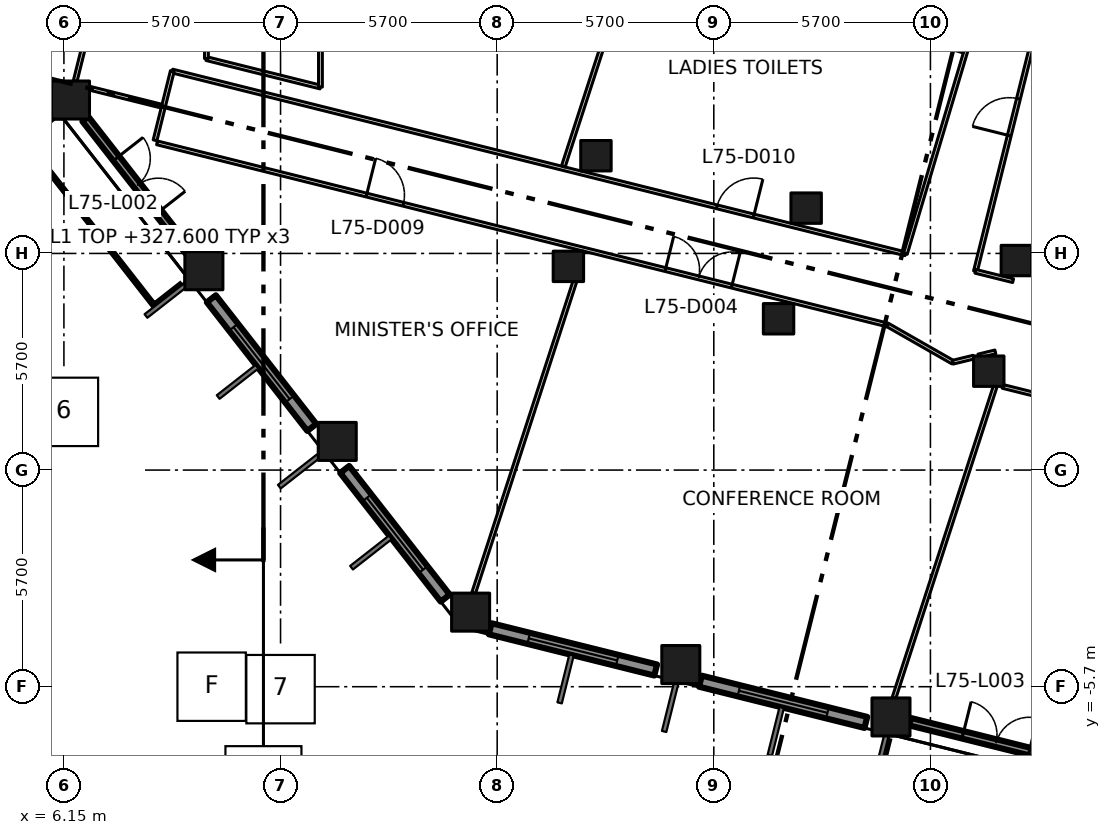
"""IFC4 building model, lengths in metres.
Left out: names, types, materials, properties, quantities, classifications, styles, units other than length and angle.
Written with IfcOpenShell. Run it as: python <this file> out.ifc"""

import sys

from ifc_helpers import new_model, si_unit, direction, frame, frame_2d, origin, origin_2d, place, context, subcontext, project, spatial, rectangle, extrude, element, fill, save


model = new_model("IFC4")
c1 = context("Model", 3, precision=1e-05, world=origin(), true_north=direction((0.0, 1.0)))
c2 = subcontext(c1, "Body", "Model", "MODEL_VIEW")
j1 = project(units=[si_unit("LENGTHUNIT", "METRE"), si_unit("PLANEANGLEUNIT", "RADIAN")], contexts=[c1])
p1 = place(None, origin())
s1 = spatial("IfcSite", under=j1, at=p1, CompositionType="ELEMENT")
p2 = place(p1, origin())
s2 = spatial("IfcBuilding", under=s1, at=p2, CompositionType="ELEMENT")
p3 = place(p2, frame((0.0, 0.0, 327.6)))
s3 = spatial("IfcBuildingStorey", under=s2, at=p3, CompositionType="ELEMENT", Elevation=327.6)
for number, where, z_axis, x_axis in (
    (1, (16.851, -3.738, 0.0), (0.0, 0.0, 1.0), (1.0, 0.0, 0.0)),
    (2, (13.342, 0.754, 0.0), (0.0, 0.0, 1.0), (1.0, 0.0, 0.0)),
    (3, (9.833, 5.245, 0.0), (0.0, 0.0, 1.0), (1.0, 0.0, 0.0)),
    (4, (6.323, 9.737, 0.0), (0.0, 0.0, 1.0), (1.0, 0.0, 0.0)),
    (5, (22.382, -5.117, 0.0), (0.0, 0.0, 1.0), (1.0, 0.0, 0.0)),
    (6, (27.912, -6.496, 0.0), (0.0, 0.0, 1.0), (1.0, 0.0, 0.0)),
):
    element("IfcColumn", number, at=place(p3, frame(where, z_axis=z_axis, x_axis=x_axis)), inside=s3, PredefinedType="COLUMN", context=c2, shape_type="SweptSolid", body=[
        extrude(rectangle(XDim=1.0, YDim=1.0, at=origin_2d()), origin(), (0.0, 0.0, 1.0), 4.2),
    ])
for number, where, z_axis, x_axis in (
    (7, (19.424, 5.36, 0.0), (0.0, 0.0, 1.0), (1.0, 0.0, 0.0)),
    (8, (24.954, 3.981, 0.0), (0.0, 0.0, 1.0), (1.0, 0.0, 0.0)),
    (9, (30.485, 2.602, 0.0), (0.0, 0.0, 1.0), (1.0, 0.0, 0.0)),
    (10, (20.149, 8.271, 0.0), (0.0, 0.0, 1.0), (1.0, 0.0, 0.0)),
    (11, (25.68, 6.892, 0.0), (0.0, 0.0, 1.0), (1.0, 0.0, 0.0)),
    (12, (31.211, 5.513, 0.0), (0.0, 0.0, 1.0), (1.0, 0.0, 0.0)),
):
    element("IfcColumn", number, at=place(p3, frame(where, z_axis=z_axis, x_axis=x_axis)), inside=s3, PredefinedType="COLUMN", context=c2, shape_type="SweptSolid", body=[
        extrude(rectangle(XDim=0.8, YDim=0.8, at=origin_2d()), origin(), (0.0, 0.0, 1.0), 4.2),
    ])
p4 = place(p3, frame((6.715, 9.237, 0.0), z_axis=(0.0, 0.0, 1.0), x_axis=(0.615465445194, -0.788163869873, 0.0)))
e13 = element("IfcWall", 13, at=p4, inside=s3, PredefinedType="SOLIDWALL", context=c2, shape_type="SweptSolid", body=[
    extrude(rectangle(XDim=4.43, YDim=0.2, at=frame_2d((2.215, 0.0))), origin(), (0.0, 0.0, 1.0), 3.2),
])
p5 = place(p4, frame((1.315, 0.0, 0.0)))
e14 = element("IfcOpeningElement", 14, at=p5, cuts=e13, PredefinedType="OPENING", context=c2, shape_type="SweptSolid", body=[
    extrude(rectangle(XDim=1.8, YDim=2.9, at=frame_2d((0.9, 1.45))), frame((0.0, 0.11, 0.0), z_axis=(0.0, -1.0, 0.0), x_axis=(1.0, 0.0, 0.0)), (0.0, 0.0, 1.0), 0.22),
])
p6 = place(p3, frame((10.029, 4.507, 0.0), z_axis=(0.0, 0.0, 1.0), x_axis=(0.615572343689, -0.788080382756, 0.0)))
e15 = element("IfcWall", 15, at=p6, inside=s3, PredefinedType="SOLIDWALL", context=c2, shape_type="SweptSolid", body=[
    extrude(rectangle(XDim=4.295, YDim=0.3, at=frame_2d((2.147, 0.0))), origin(), (0.0, 0.0, 1.0), 3.2),
])
p7 = place(p6, frame((0.948, 0.0, 0.8)))
e16 = element("IfcOpeningElement", 16, at=p7, cuts=e15, PredefinedType="OPENING", context=c2, shape_type="SweptSolid", body=[
    extrude(rectangle(XDim=2.4, YDim=2.1, at=frame_2d((1.2, 1.05))), frame((0.0, 0.16, 0.0), z_axis=(0.0, -1.0, 0.0), x_axis=(1.0, 0.0, 0.0)), (0.0, 0.0, 1.0), 0.32),
])
p8 = place(p3, frame((13.538, 0.016, 0.0), z_axis=(0.0, 0.0, 1.0), x_axis=(0.615713519567, -0.787970089421, 0.0)))
e17 = element("IfcWall", 17, at=p8, inside=s3, PredefinedType="SOLIDWALL", context=c2, shape_type="SweptSolid", body=[
    extrude(rectangle(XDim=4.296, YDim=0.3, at=frame_2d((2.148, 0.0))), origin(), (0.0, 0.0, 1.0), 3.2),
])
p9 = place(p8, frame((0.948, 0.0, 0.8)))
e18 = element("IfcOpeningElement", 18, at=p9, cuts=e17, PredefinedType="OPENING", context=c2, shape_type="SweptSolid", body=[
    extrude(rectangle(XDim=2.4, YDim=2.1, at=frame_2d((1.2, 1.05))), frame((0.0, 0.16, 0.0), z_axis=(0.0, -1.0, 0.0), x_axis=(1.0, 0.0, 0.0)), (0.0, 0.0, 1.0), 0.32),
])
p10 = place(p3, frame((17.367, -4.176, 0.0), z_axis=(0.0, 0.0, 1.0), x_axis=(0.970327846266, -0.241793032904, 0.0)))
e19 = element("IfcWall", 19, at=p10, inside=s3, PredefinedType="SOLIDWALL", context=c2, shape_type="SweptSolid", body=[
    extrude(rectangle(XDim=4.487, YDim=0.3, at=frame_2d((2.244, 0.0))), origin(), (0.0, 0.0, 1.0), 3.2),
])
p11 = place(p10, frame((1.044, 0.0, 0.8)))
e20 = element("IfcOpeningElement", 20, at=p11, cuts=e19, PredefinedType="OPENING", context=c2, shape_type="SweptSolid", body=[
    extrude(rectangle(XDim=2.4, YDim=2.1, at=frame_2d((1.2, 1.05))), frame((0.0, 0.16, 0.0), z_axis=(0.0, -1.0, 0.0), x_axis=(1.0, 0.0, 0.0)), (0.0, 0.0, 1.0), 0.32),
])
p12 = place(p3, frame((22.898, -5.555, 0.0), z_axis=(0.0, 0.0, 1.0), x_axis=(0.970315118421, -0.24184410467, 0.0)))
e21 = element("IfcWall", 21, at=p12, inside=s3, PredefinedType="SOLIDWALL", context=c2, shape_type="SweptSolid", body=[
    extrude(rectangle(XDim=4.486, YDim=0.3, at=frame_2d((2.243, 0.0))), origin(), (0.0, 0.0, 1.0), 3.2),
])
p13 = place(p12, frame((1.044, 0.0, 0.8)))
e22 = element("IfcOpeningElement", 22, at=p13, cuts=e21, PredefinedType="OPENING", context=c2, shape_type="SweptSolid", body=[
    extrude(rectangle(XDim=2.4, YDim=2.1, at=frame_2d((1.2, 1.05))), frame((0.0, 0.16, 0.0), z_axis=(0.0, -1.0, 0.0), x_axis=(1.0, 0.0, 0.0)), (0.0, 0.0, 1.0), 0.32),
])
p14 = place(p3, frame((28.412, -6.62, 0.0), z_axis=(0.0, 0.0, 1.0), x_axis=(0.970286870015, -0.241957413354, 0.0)))
e23 = element("IfcWall", 23, at=p14, inside=s3, PredefinedType="SOLIDWALL", context=c2, shape_type="SweptSolid", body=[
    extrude(rectangle(XDim=4.67, YDim=0.2, at=frame_2d((2.335, 0.0))), origin(), (0.0, 0.0, 1.0), 3.2),
])
p15 = place(p14, frame((1.434, 0.0, 0.0)))
e24 = element("IfcOpeningElement", 24, at=p15, cuts=e23, PredefinedType="OPENING", context=c2, shape_type="SweptSolid", body=[
    extrude(rectangle(XDim=1.8, YDim=2.9, at=frame_2d((0.9, 1.45))), frame((0.0, 0.11, 0.0), z_axis=(0.0, -1.0, 0.0), x_axis=(1.0, 0.0, 0.0)), (0.0, 0.0, 1.0), 0.22),
])
p16 = place(p3, frame((8.601, 8.61, 0.0), z_axis=(0.0, 0.0, 1.0), x_axis=(0.970290921205, -0.241941166872, 0.0)))
e25 = element("IfcWall", 25, at=p16, inside=s3, PredefinedType="PARTITIONING", context=c2, shape_type="SweptSolid", body=[
    extrude(rectangle(XDim=19.812, YDim=0.1, at=frame_2d((9.906, 0.0))), origin(), (0.0, 0.0, 1.0), 3.9),
])
p17 = place(p16, frame((13.785, 0.0, 0.0)))
e26 = element("IfcOpeningElement", 26, at=p17, cuts=e25, PredefinedType="OPENING", context=c2, shape_type="SweptSolid", body=[
    extrude(rectangle(XDim=1.8, YDim=2.1, at=frame_2d((0.9, 1.05))), frame((0.0, 0.06, 0.0), z_axis=(0.0, -1.0, 0.0), x_axis=(1.0, 0.0, 0.0)), (0.0, 0.0, 1.0), 0.12),
])
p18 = place(p16, frame((5.68, 0.0, 0.0)))
e27 = element("IfcOpeningElement", 27, at=p18, cuts=e25, PredefinedType="OPENING", context=c2, shape_type="SweptSolid", body=[
    extrude(rectangle(XDim=1.0, YDim=2.1, at=frame_2d((0.5, 1.05))), frame((0.0, 0.06, 0.0), z_axis=(0.0, -1.0, 0.0), x_axis=(1.0, 0.0, 0.0)), (0.0, 0.0, 1.0), 0.12),
])
p19 = place(p3, frame((9.002, 10.499, 0.0), z_axis=(0.0, 0.0, 1.0), x_axis=(0.970298340477, -0.241911410372, 0.0)))
e28 = element("IfcWall", 28, at=p19, inside=s3, PredefinedType="PARTITIONING", context=c2, shape_type="SweptSolid", body=[
    extrude(rectangle(XDim=19.88, YDim=0.1, at=frame_2d((9.94, 0.0))), origin(), (0.0, 0.0, 1.0), 3.9),
])
p20 = place(p19, frame((14.766, 0.0, 0.0)))
e29 = element("IfcOpeningElement", 29, at=p20, cuts=e28, PredefinedType="OPENING", context=c2, shape_type="SweptSolid", body=[
    extrude(rectangle(XDim=1.0, YDim=2.1, at=frame_2d((0.5, 1.05))), frame((0.0, 0.06, 0.0), z_axis=(0.0, -1.0, 0.0), x_axis=(1.0, 0.0, 0.0)), (0.0, 0.0, 1.0), 0.12),
])
p21 = place(p3, frame((9.002, 10.499, 0.0), z_axis=(0.0, 0.0, 1.0), x_axis=(-0.241709519716, -0.970348652845, 0.0)))
e30 = element("IfcWall", 30, at=p21, inside=s3, PredefinedType="PARTITIONING", context=c2, shape_type="SweptSolid", body=[
    extrude(rectangle(XDim=1.878, YDim=0.1, at=frame_2d((0.939, 0.0))), origin(), (0.0, 0.0, 1.0), 3.9),
])
p22 = place(p3, frame((9.9, 10.826, 0.0), z_axis=(0.0, 0.0, 1.0), x_axis=(0.970290953223, -0.241941038466, 0.0)))
e31 = element("IfcWall", 31, at=p22, inside=s3, PredefinedType="PARTITIONING", context=c2, shape_type="SweptSolid", body=[
    extrude(rectangle(XDim=3.092, YDim=0.1, at=frame_2d((1.546, 0.0))), origin(), (0.0, 0.0, 1.0), 3.9),
])
p23 = place(p3, frame((9.9, 12.2, 0.0), z_axis=(0.0, 0.0, 1.0), x_axis=(0.0, -1.0, 0.0)))
e32 = element("IfcWall", 32, at=p23, inside=s3, PredefinedType="PARTITIONING", context=c2, shape_type="SweptSolid", body=[
    extrude(rectangle(XDim=1.374, YDim=0.1, at=frame_2d((0.687, 0.0))), origin(), (0.0, 0.0, 1.0), 3.9),
])
p24 = place(p3, frame((12.9, 10.078, 0.0), z_axis=(0.0, 0.0, 1.0), x_axis=(0.0, 1.0, 0.0)))
e33 = element("IfcWall", 33, at=p24, inside=s3, PredefinedType="PARTITIONING", context=c2, shape_type="SweptSolid", body=[
    extrude(rectangle(XDim=4.022, YDim=0.1, at=frame_2d((2.011, 0.0))), origin(), (0.0, 0.0, 1.0), 3.9),
])
p25 = place(p24, frame((1.58, 0.0, 0.0)))
e34 = element("IfcOpeningElement", 34, at=p25, cuts=e33, PredefinedType="OPENING", context=c2, shape_type="SweptSolid", body=[
    extrude(rectangle(XDim=1.0, YDim=2.1, at=frame_2d((0.5, 1.05))), frame((0.0, 0.06, 0.0), z_axis=(0.0, -1.0, 0.0), x_axis=(1.0, 0.0, 0.0)), (0.0, 0.0, 1.0), 0.12),
])
p26 = place(p3, frame((27.824, 3.817, 0.0), z_axis=(0.0, 0.0, 1.0), x_axis=(0.868349676245, -0.495952457163, 0.0)))
e35 = element("IfcWall", 35, at=p26, inside=s3, PredefinedType="PARTITIONING", context=c2, shape_type="SweptSolid", body=[
    extrude(rectangle(XDim=1.974, YDim=0.1, at=frame_2d((0.987, 0.0))), origin(), (0.0, 0.0, 1.0), 3.9),
])
p27 = place(p3, frame((28.291, 5.69, 0.0), z_axis=(0.0, 0.0, 1.0), x_axis=(0.28588265334, 0.958264633867, 0.0)))
e36 = element("IfcWall", 36, at=p27, inside=s3, PredefinedType="PARTITIONING", context=c2, shape_type="SweptSolid", body=[
    extrude(rectangle(XDim=8.776, YDim=0.1, at=frame_2d((4.388, 0.0))), origin(), (0.0, 0.0, 1.0), 3.9),
])
p28 = place(p27, frame((6.23, 0.0, 0.0)))
e37 = element("IfcOpeningElement", 37, at=p28, cuts=e36, PredefinedType="OPENING", context=c2, shape_type="SweptSolid", body=[
    extrude(rectangle(XDim=1.0, YDim=2.1, at=frame_2d((0.5, 1.05))), frame((0.0, 0.06, 0.0), z_axis=(0.0, -1.0, 0.0), x_axis=(1.0, 0.0, 0.0)), (0.0, 0.0, 1.0), 0.12),
])
p29 = place(p3, frame((29.538, 2.838, 0.0), z_axis=(0.0, 0.0, 1.0), x_axis=(0.971654139629, 0.236406922365, 0.0)))
e38 = element("IfcWall", 38, at=p29, inside=s3, PredefinedType="PARTITIONING", context=c2, shape_type="SweptSolid", body=[
    extrude(rectangle(XDim=0.563, YDim=0.1, at=frame_2d((0.281, 0.0))), origin(), (0.0, 0.0, 1.0), 3.9),
])
p30 = place(p3, frame((30.134, 5.23, 0.0), z_axis=(0.0, 0.0, 1.0), x_axis=(0.24199734369, 0.970276911839, 0.0)))
e39 = element("IfcWall", 39, at=p30, inside=s3, PredefinedType="PARTITIONING", context=c2, shape_type="SweptSolid", body=[
    extrude(rectangle(XDim=8.111, YDim=0.1, at=frame_2d((4.056, 0.0))), origin(), (0.0, 0.0, 1.0), 3.9),
])
p31 = place(p30, frame((3.68, 0.0, 0.0)))
e40 = element("IfcOpeningElement", 40, at=p31, cuts=e39, PredefinedType="OPENING", context=c2, shape_type="SweptSolid", body=[
    extrude(rectangle(XDim=1.0, YDim=2.1, at=frame_2d((0.5, 1.05))), frame((0.0, 0.06, 0.0), z_axis=(0.0, -1.0, 0.0), x_axis=(1.0, 0.0, 0.0)), (0.0, 0.0, 1.0), 0.12),
])
p32 = place(p3, frame((30.213, 3.002, 0.0), z_axis=(0.0, 0.0, 1.0), x_axis=(0.971720514556, 0.236133948408, 0.0)))
e41 = element("IfcWall", 41, at=p32, inside=s3, PredefinedType="PARTITIONING", context=c2, shape_type="SweptSolid", body=[
    extrude(rectangle(XDim=0.458, YDim=0.1, at=frame_2d((0.229, 0.0))), origin(), (0.0, 0.0, 1.0), 3.9),
])
p33 = place(p3, frame((30.849, 2.202, 0.0), z_axis=(0.0, 0.0, 1.0), x_axis=(0.970320559999, -0.241822271189, 0.0)))
e42 = element("IfcWall", 42, at=p33, inside=s3, PredefinedType="PARTITIONING", context=c2, shape_type="SweptSolid", body=[
    extrude(rectangle(XDim=4.913, YDim=0.1, at=frame_2d((2.456, 0.0))), origin(), (0.0, 0.0, 1.0), 3.9),
])
p34 = place(p33, frame((1.58, 0.0, 0.0)))
e43 = element("IfcOpeningElement", 43, at=p34, cuts=e42, PredefinedType="OPENING", context=c2, shape_type="SweptSolid", body=[
    extrude(rectangle(XDim=1.8, YDim=2.1, at=frame_2d((0.9, 1.05))), frame((0.0, 0.06, 0.0), z_axis=(0.0, -1.0, 0.0), x_axis=(1.0, 0.0, 0.0)), (0.0, 0.0, 1.0), 0.12),
])
p35 = place(p3, frame((31.125, 4.983, 0.0), z_axis=(0.0, 0.0, 1.0), x_axis=(-0.970296981152, 0.24191686251, 0.0)))
e44 = element("IfcWall", 44, at=p35, inside=s3, PredefinedType="PARTITIONING", context=c2, shape_type="SweptSolid", body=[
    extrude(rectangle(XDim=1.021, YDim=0.1, at=frame_2d((0.511, 0.0))), origin(), (0.0, 0.0, 1.0), 3.9),
])
p36 = place(p3, frame((6.922, 12.138, 0.0), z_axis=(0.0, 0.0, 1.0), x_axis=(-0.242476987996, -0.970157157523, 0.0)))
e45 = element("IfcWall", 45, at=p36, inside=s3, PredefinedType="PARTITIONING", context=c2, shape_type="SweptSolid", body=[
    extrude(rectangle(XDim=1.959, YDim=0.1, at=frame_2d((0.98, 0.0))), origin(), (0.0, 0.0, 1.0), 3.9),
])
p37 = place(p3, frame((8.72, 9.575, 0.0), z_axis=(0.0, 0.0, 1.0), x_axis=(-0.970274576003, 0.242006708918, 0.0)))
e46 = element("IfcWall", 46, at=p37, inside=s3, PredefinedType="PARTITIONING", context=c2, shape_type="SweptSolid", body=[
    extrude(rectangle(XDim=1.955, YDim=0.1, at=frame_2d((0.978, 0.0))), origin(), (0.0, 0.0, 1.0), 3.9),
])
p38 = place(p3, frame((16.93, -3.238, 0.0), z_axis=(0.0, 0.0, 1.0), x_axis=(0.308953497737, 0.95107714526, 0.0)))
e47 = element("IfcWall", 47, at=p38, inside=s3, PredefinedType="PARTITIONING", context=c2, shape_type="SweptSolid", body=[
    extrude(rectangle(XDim=8.62, YDim=0.1, at=frame_2d((4.31, 0.0))), origin(), (0.0, 0.0, 1.0), 3.9),
])
p39 = place(p3, frame((19.291, 7.989, 0.0), z_axis=(0.0, 0.0, 1.0), x_axis=(0.308911656913, 0.951090736062, 0.0)))
e48 = element("IfcWall", 48, at=p39, inside=s3, PredefinedType="PARTITIONING", context=c2, shape_type="SweptSolid", body=[
    extrude(rectangle(XDim=6.425, YDim=0.1, at=frame_2d((3.213, 0.0))), origin(), (0.0, 0.0, 1.0), 3.9),
])
p40 = place(p3, frame((27.991, -5.996, 0.0), z_axis=(0.0, 0.0, 1.0), x_axis=(0.308953497737, 0.95107714526, 0.0)))
e49 = element("IfcWall", 49, at=p40, inside=s3, PredefinedType="PARTITIONING", context=c2, shape_type="SweptSolid", body=[
    extrude(rectangle(XDim=8.62, YDim=0.1, at=frame_2d((4.31, 0.0))), origin(), (0.0, 0.0, 1.0), 3.9),
])
p41 = place(p3, frame((29.83, 11.023, 0.0), z_axis=(0.0, 0.0, 1.0), x_axis=(-0.95828086131, 0.285828254108, 0.0)))
e50 = element("IfcWall", 50, at=p41, inside=s3, PredefinedType="PARTITIONING", context=c2, shape_type="SweptSolid", body=[
    extrude(rectangle(XDim=2.551, YDim=0.1, at=frame_2d((1.275, 0.0))), origin(), (0.0, 0.0, 1.0), 3.9),
])
p42 = place(p5, origin())
e51 = element("IfcDoor", 51, at=p42, inside=s3, OperationType="DOUBLE_DOOR_SINGLE_SWING", PredefinedType="DOOR", context=c2, shape_type="SweptSolid", body=[
    extrude(rectangle(XDim=1.8, YDim=2.9, at=frame_2d((0.9, 1.45))), frame((0.0, 0.025, 0.0), z_axis=(0.0, -1.0, 0.0), x_axis=(1.0, 0.0, 0.0)), (0.0, 0.0, 1.0), 0.05),
])
fill(e14, e51)
p43 = place(p7, origin())
e52 = element("IfcWindow", 52, at=p43, inside=s3, PartitioningType="DOUBLE_PANEL_VERTICAL", PredefinedType="WINDOW", context=c2, shape_type="SweptSolid", body=[
    extrude(rectangle(XDim=2.4, YDim=2.1, at=frame_2d((1.2, 1.05))), frame((0.0, 0.03, 0.0), z_axis=(0.0, -1.0, 0.0), x_axis=(1.0, 0.0, 0.0)), (0.0, 0.0, 1.0), 0.06),
])
fill(e16, e52)
p44 = place(p9, origin())
e53 = element("IfcWindow", 53, at=p44, inside=s3, PartitioningType="DOUBLE_PANEL_VERTICAL", PredefinedType="WINDOW", context=c2, shape_type="SweptSolid", body=[
    extrude(rectangle(XDim=2.4, YDim=2.1, at=frame_2d((1.2, 1.05))), frame((0.0, 0.03, 0.0), z_axis=(0.0, -1.0, 0.0), x_axis=(1.0, 0.0, 0.0)), (0.0, 0.0, 1.0), 0.06),
])
fill(e18, e53)
p45 = place(p11, origin())
e54 = element("IfcWindow", 54, at=p45, inside=s3, PartitioningType="DOUBLE_PANEL_VERTICAL", PredefinedType="WINDOW", context=c2, shape_type="SweptSolid", body=[
    extrude(rectangle(XDim=2.4, YDim=2.1, at=frame_2d((1.2, 1.05))), frame((0.0, 0.03, 0.0), z_axis=(0.0, -1.0, 0.0), x_axis=(1.0, 0.0, 0.0)), (0.0, 0.0, 1.0), 0.06),
])
fill(e20, e54)
p46 = place(p13, origin())
e55 = element("IfcWindow", 55, at=p46, inside=s3, PartitioningType="DOUBLE_PANEL_VERTICAL", PredefinedType="WINDOW", context=c2, shape_type="SweptSolid", body=[
    extrude(rectangle(XDim=2.4, YDim=2.1, at=frame_2d((1.2, 1.05))), frame((0.0, 0.03, 0.0), z_axis=(0.0, -1.0, 0.0), x_axis=(1.0, 0.0, 0.0)), (0.0, 0.0, 1.0), 0.06),
])
fill(e22, e55)
p47 = place(p15, origin())
e56 = element("IfcDoor", 56, at=p47, inside=s3, OperationType="DOUBLE_DOOR_SINGLE_SWING", PredefinedType="DOOR", context=c2, shape_type="SweptSolid", body=[
    extrude(rectangle(XDim=1.8, YDim=2.9, at=frame_2d((0.9, 1.45))), frame((0.0, 0.025, 0.0), z_axis=(0.0, -1.0, 0.0), x_axis=(1.0, 0.0, 0.0)), (0.0, 0.0, 1.0), 0.05),
])
fill(e24, e56)
p48 = place(p17, origin())
e57 = element("IfcDoor", 57, at=p48, inside=s3, OperationType="DOUBLE_DOOR_SINGLE_SWING", PredefinedType="DOOR", context=c2, shape_type="SweptSolid", body=[
    extrude(rectangle(XDim=1.8, YDim=2.1, at=frame_2d((0.9, 1.05))), frame((0.0, 0.025, 0.0), z_axis=(0.0, -1.0, 0.0), x_axis=(1.0, 0.0, 0.0)), (0.0, 0.0, 1.0), 0.05),
])
fill(e26, e57)
p49 = place(p18, origin())
e58 = element("IfcDoor", 58, at=p49, inside=s3, OperationType="SINGLE_SWING_LEFT", PredefinedType="DOOR", context=c2, shape_type="SweptSolid", body=[
    extrude(rectangle(XDim=1.0, YDim=2.1, at=frame_2d((0.5, 1.05))), frame((0.0, 0.025, 0.0), z_axis=(0.0, -1.0, 0.0), x_axis=(1.0, 0.0, 0.0)), (0.0, 0.0, 1.0), 0.05),
])
fill(e27, e58)
p50 = place(p20, origin())
e59 = element("IfcDoor", 59, at=p50, inside=s3, OperationType="SINGLE_SWING_RIGHT", PredefinedType="DOOR", context=c2, shape_type="SweptSolid", body=[
    extrude(rectangle(XDim=1.0, YDim=2.1, at=frame_2d((0.5, 1.05))), frame((0.0, 0.025, 0.0), z_axis=(0.0, -1.0, 0.0), x_axis=(1.0, 0.0, 0.0)), (0.0, 0.0, 1.0), 0.05),
])
fill(e29, e59)
p51 = place(p31, origin())
e60 = element("IfcDoor", 60, at=p51, inside=s3, OperationType="SINGLE_SWING_LEFT", PredefinedType="DOOR", context=c2, shape_type="SweptSolid", body=[
    extrude(rectangle(XDim=1.0, YDim=2.1, at=frame_2d((0.5, 1.05))), frame((0.0, 0.025, 0.0), z_axis=(0.0, -1.0, 0.0), x_axis=(1.0, 0.0, 0.0)), (0.0, 0.0, 1.0), 0.05),
])
fill(e40, e60)
save(model, sys.argv[1])
